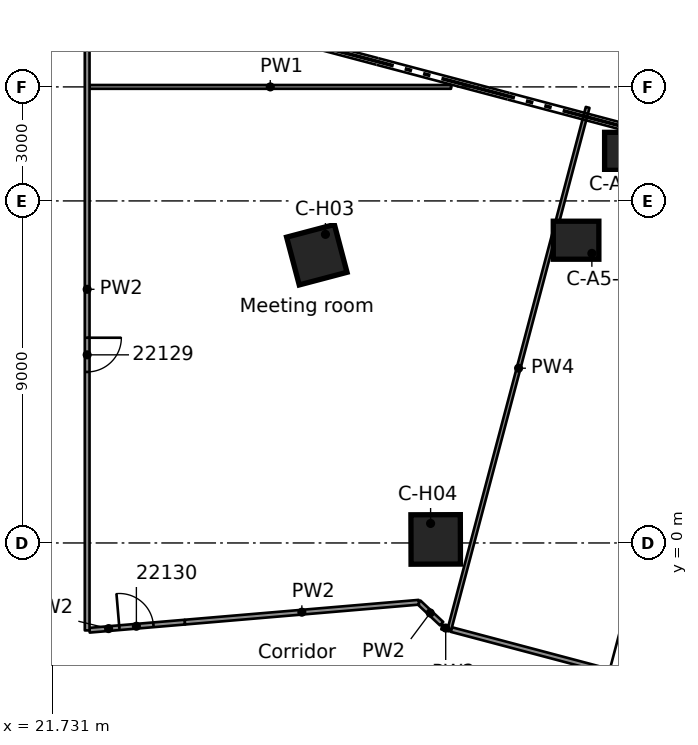
"""IFC4 building model, lengths in metres.
Left out: names, types, materials, properties, quantities, classifications, styles, units other than length and angle.
Written with IfcOpenShell. Run it as: python <this file> out.ifc"""

import sys

from ifc_helpers import new_model, si_unit, direction, frame, frame_2d, origin, origin_2d, place, context, subcontext, project, spatial, rectangle, extrude, element, fill, save


model = new_model("IFC4")
c1 = context("Model", 3, precision=1e-05, world=origin(), true_north=direction((0.0, 1.0)))
c2 = subcontext(c1, "Body", "Model", "MODEL_VIEW")
j1 = project(units=[si_unit("LENGTHUNIT", "METRE"), si_unit("PLANEANGLEUNIT", "RADIAN")], contexts=[c1])
p1 = place(None, origin())
s1 = spatial("IfcSite", under=j1, at=p1, CompositionType="ELEMENT")
p2 = place(p1, origin())
s2 = spatial("IfcBuilding", under=s1, at=p2, CompositionType="ELEMENT")
p3 = place(p2, frame((0.0, 0.0, 116.2)))
s3 = spatial("IfcBuildingStorey", under=s2, at=p3, CompositionType="ELEMENT", Elevation=116.2)
for number, where, z_axis, x_axis in (
    (1, (36.867, 10.305, 0.0), (0.0, 0.0, 1.0), (1.0, 0.0, 0.0)),
    (2, (35.516, 7.966, 0.0), (0.0, 0.0, 1.0), (1.0, 0.0, 0.0)),
):
    element("IfcColumn", number, at=place(p3, frame(where, z_axis=z_axis, x_axis=x_axis)), inside=s3, PredefinedType="COLUMN", context=c2, shape_type="SweptSolid", body=[
        extrude(rectangle(XDim=1.2, YDim=1.0, at=origin_2d()), origin(), (0.0, 0.0, 1.0), 3.5),
    ])
for number, where, z_axis, x_axis in (
    (3, (28.694, 7.584, 0.0), (0.0, 0.0, 1.0), (0.967, 0.256, 0.0)),
    (4, (31.822, 0.093, 0.0), (0.0, 0.0, 1.0), (1.0, 0.003, 0.0)),
):
    element("IfcColumn", number, at=place(p3, frame(where, z_axis=z_axis, x_axis=x_axis)), inside=s3, PredefinedType="COLUMN", context=c2, shape_type="SweptSolid", body=[
        extrude(rectangle(XDim=1.3, YDim=1.3, at=origin_2d()), origin(), (0.0, 0.0, 1.0), 3.5),
    ])
p4 = place(p3, frame((31.378, -1.56, 0.0), z_axis=(0.0, 0.0, 1.0), x_axis=(0.728704597213, -0.684828160928, 0.0)))
e5 = element("IfcWall", 5, at=p4, inside=s3, PredefinedType="PARTITIONING", context=c2, shape_type="SweptSolid", body=[
    extrude(rectangle(XDim=0.823, YDim=0.125, at=frame_2d((0.412, 0.0))), origin(), (0.0, 0.0, 1.0), 3.08),
])
p5 = place(p3, frame((31.985, -2.212, 0.0), z_axis=(0.0, 0.0, 1.0), x_axis=(0.966952674041, -0.25495592985, 0.0)))
e6 = element("IfcWall", 6, at=p5, inside=s3, PredefinedType="PARTITIONING", context=c2, shape_type="SweptSolid", body=[
    extrude(rectangle(XDim=0.208, YDim=0.125, at=frame_2d((0.104, 0.0))), origin(), (0.0, 0.0, 1.0), 3.08),
])
p6 = place(p3, frame((32.234, -2.278, 0.0), z_axis=(0.0, 0.0, 1.0), x_axis=(0.966664542412, -0.256046211541, 0.0)))
e7 = element("IfcWall", 7, at=p6, inside=s3, PredefinedType="PARTITIONING", context=c2, shape_type="SweptSolid", body=[
    extrude(rectangle(XDim=24.456, YDim=0.125, at=frame_2d((12.228, 0.0))), origin(), (0.0, 0.0, 1.0), 3.08),
])
p7 = place(p6, frame((4.3, 0.0, 0.0)))
e8 = element("IfcOpeningElement", 8, at=p7, cuts=e7, PredefinedType="OPENING", context=c2, shape_type="SweptSolid", body=[
    extrude(rectangle(XDim=1.8, YDim=2.1, at=frame_2d((0.9, 1.05))), frame((0.0, 0.073, 0.0), z_axis=(0.0, -1.0, 0.0), x_axis=(1.0, 0.0, 0.0)), (0.0, 0.0, 1.0), 0.145),
])
p8 = place(p6, frame((13.357, 0.0, 0.0)))
e9 = element("IfcOpeningElement", 9, at=p8, cuts=e7, PredefinedType="OPENING", context=c2, shape_type="SweptSolid", body=[
    extrude(rectangle(XDim=0.9, YDim=2.1, at=frame_2d((0.45, 1.05))), frame((0.0, 0.073, 0.0), z_axis=(0.0, -1.0, 0.0), x_axis=(1.0, 0.0, 0.0)), (0.0, 0.0, 1.0), 0.145),
])
p9 = place(p6, frame((19.356, 0.0, 0.0)))
e10 = element("IfcOpeningElement", 10, at=p9, cuts=e7, PredefinedType="OPENING", context=c2, shape_type="SweptSolid", body=[
    extrude(rectangle(XDim=0.9, YDim=2.1, at=frame_2d((0.45, 1.05))), frame((0.0, 0.073, 0.0), z_axis=(0.0, -1.0, 0.0), x_axis=(1.0, 0.0, 0.0)), (0.0, 0.0, 1.0), 0.145),
])
p10 = place(p3, frame((22.713, 12.0, 0.0), z_axis=(0.0, 0.0, 1.0), x_axis=(1.0, 0.0, 0.0)))
e11 = element("IfcWall", 11, at=p10, inside=s3, PredefinedType="PARTITIONING", context=c2, shape_type="SweptSolid", body=[
    extrude(rectangle(XDim=9.513, YDim=0.1, at=frame_2d((4.757, 0.0))), origin(), (0.0, 0.0, 1.0), 3.08),
])
p11 = place(p3, frame((22.713, -2.296, 0.0), z_axis=(0.0, 0.0, 1.0), x_axis=(0.996422359033, 0.084513208547, 0.0)))
e12 = element("IfcWall", 12, at=p11, inside=s3, PredefinedType="PARTITIONING", context=c2, shape_type="SweptSolid", body=[
    extrude(rectangle(XDim=2.519, YDim=0.125, at=frame_2d((1.26, 0.0))), origin(), (0.0, 0.0, 1.0), 3.08),
])
p12 = place(p11, frame((0.788, 0.0, 0.0)))
e13 = element("IfcOpeningElement", 13, at=p12, cuts=e12, PredefinedType="OPENING", context=c2, shape_type="SweptSolid", body=[
    extrude(rectangle(XDim=0.9, YDim=2.1, at=frame_2d((0.45, 1.05))), frame((0.0, 0.073, 0.0), z_axis=(0.0, -1.0, 0.0), x_axis=(1.0, 0.0, 0.0)), (0.0, 0.0, 1.0), 0.145),
])
p13 = place(p3, frame((25.223, -2.083, 0.0), z_axis=(0.0, 0.0, 1.0), x_axis=(0.996410075985, 0.084657902612, 0.0)))
e14 = element("IfcWall", 14, at=p13, inside=s3, PredefinedType="PARTITIONING", context=c2, shape_type="SweptSolid", body=[
    extrude(rectangle(XDim=6.177, YDim=0.125, at=frame_2d((3.089, 0.0))), origin(), (0.0, 0.0, 1.0), 3.08),
])
p14 = place(p3, frame((32.186, -2.265, 0.0), z_axis=(0.0, 0.0, 1.0), x_axis=(0.2560045642, 0.966675572831, 0.0)))
e15 = element("IfcWall", 15, at=p14, inside=s3, PredefinedType="PARTITIONING", context=c2, shape_type="SweptSolid", body=[
    extrude(rectangle(XDim=14.199, YDim=0.1, at=frame_2d((7.1, 0.0))), origin(), (0.0, 0.0, 1.0), 2.445),
])
p15 = place(p3, frame((22.651, 15.65, 0.0), z_axis=(0.0, 0.0, 1.0), x_axis=(0.0, -1.0, 0.0)))
e16 = element("IfcWall", 16, at=p15, inside=s3, PredefinedType="PARTITIONING", context=c2, shape_type="SweptSolid", body=[
    extrude(rectangle(XDim=17.951, YDim=0.125, at=frame_2d((8.976, 0.0))), origin(), (0.0, 0.0, 1.0), 3.08),
])
p16 = place(p15, frame((10.25, 0.0, 0.0)))
e17 = element("IfcOpeningElement", 17, at=p16, cuts=e16, PredefinedType="OPENING", context=c2, shape_type="SweptSolid", body=[
    extrude(rectangle(XDim=0.9, YDim=2.1, at=frame_2d((0.45, 1.05))), frame((0.0, 0.073, 0.0), z_axis=(0.0, -1.0, 0.0), x_axis=(1.0, 0.0, 0.0)), (0.0, 0.0, 1.0), 0.145),
])
p17 = place(p16, origin())
e18 = element("IfcDoor", 18, at=p17, inside=s3, OperationType="SINGLE_SWING_RIGHT", PredefinedType="DOOR", context=c2, shape_type="SweptSolid", body=[
    extrude(rectangle(XDim=0.9, YDim=2.1, at=frame_2d((0.45, 1.05))), frame((0.0, 0.025, 0.0), z_axis=(0.0, -1.0, 0.0), x_axis=(1.0, 0.0, 0.0)), (0.0, 0.0, 1.0), 0.05),
])
fill(e17, e18)
p18 = place(p12, origin())
e19 = element("IfcDoor", 19, at=p18, inside=s3, OperationType="SINGLE_SWING_LEFT", PredefinedType="DOOR", context=c2, shape_type="SweptSolid", body=[
    extrude(rectangle(XDim=0.9, YDim=2.1, at=frame_2d((0.45, 1.05))), frame((0.0, 0.025, 0.0), z_axis=(0.0, -1.0, 0.0), x_axis=(1.0, 0.0, 0.0)), (0.0, 0.0, 1.0), 0.05),
])
fill(e13, e19)
save(model, sys.argv[1])
